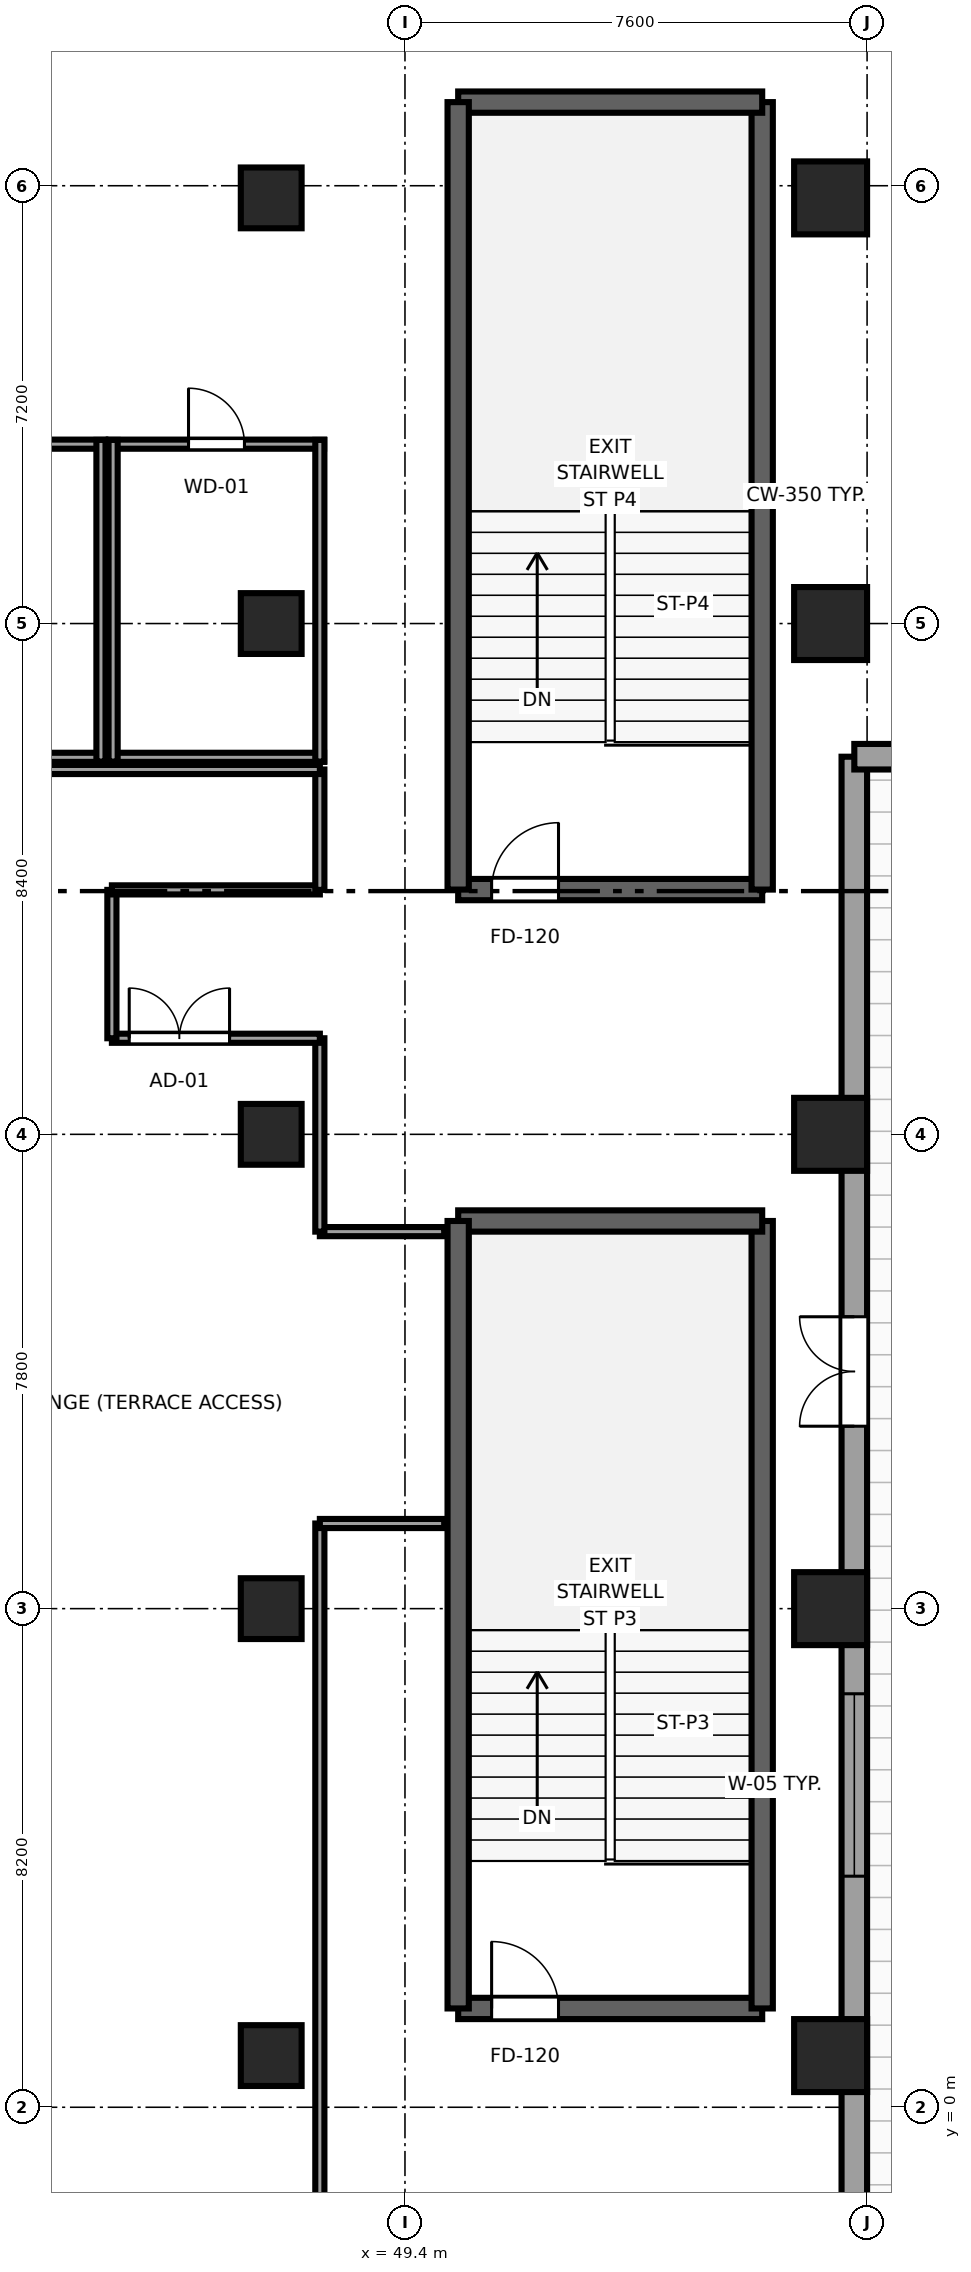
"""IFC4 building model, lengths in metres.
Left out: names, types, materials, properties, quantities, classifications, styles, units other than length and angle.
Written with IfcOpenShell. Run it as: python <this file> out.ifc"""

import sys

from ifc_helpers import new_model, si_unit, direction, frame, frame_2d, origin, origin_2d, place, context, subcontext, project, spatial, rectangle, extrude, source, transform, mapped, element, fill, save


model = new_model("IFC4")
c1 = context("Model", 3, precision=1e-05, world=origin(), true_north=direction((0.0, 1.0)))
c2 = subcontext(c1, "Body", "Model", "MODEL_VIEW")
j1 = project(units=[si_unit("LENGTHUNIT", "METRE"), si_unit("PLANEANGLEUNIT", "RADIAN")], contexts=[c1])
p1 = place(None, origin())
s1 = spatial("IfcSite", under=j1, at=p1, CompositionType="ELEMENT")
p2 = place(p1, origin())
s2 = spatial("IfcBuilding", under=s1, at=p2, CompositionType="ELEMENT")
p3 = place(p2, frame((0.0, 0.0, 26.8)))
s3 = spatial("IfcBuildingStorey", under=s2, at=p3, CompositionType="ELEMENT", Elevation=26.8)
p4 = place(p3, frame((50.275, 1.625, 0.0), z_axis=(0.0, 0.0, 1.0), x_axis=(1.0, 0.0, 0.0)))
e1 = element("IfcWall", 1, at=p4, inside=s3, PredefinedType="SHEAR", context=c2, shape_type="SweptSolid", body=[
    extrude(rectangle(XDim=5.0, YDim=0.35, at=frame_2d((2.5, 0.0))), origin(), (0.0, 0.0, 1.0), 5.2),
])
p5 = place(p4, frame((0.55, 0.0, 0.0)))
e2 = element("IfcOpeningElement", 2, at=p5, cuts=e1, PredefinedType="OPENING", context=c2, shape_type="SweptSolid", body=[
    extrude(rectangle(XDim=1.1, YDim=2.12, at=frame_2d((0.55, 1.06))), frame((0.0, 0.185, 0.0), z_axis=(0.0, -1.0, 0.0), x_axis=(1.0, 0.0, 0.0)), (0.0, 0.0, 1.0), 0.37),
])
p6 = place(p3, frame((55.275, 1.625, 0.0), z_axis=(0.0, 0.0, 1.0), x_axis=(0.0, 1.0, 0.0)))
e3 = element("IfcWall", 3, at=p6, inside=s3, PredefinedType="SHEAR", context=c2, shape_type="SweptSolid", body=[
    extrude(rectangle(XDim=12.95, YDim=0.35, at=frame_2d((6.475, 0.0))), origin(), (0.0, 0.0, 1.0), 5.2),
])
p7 = place(p3, frame((55.275, 14.575, 0.0), z_axis=(0.0, 0.0, 1.0), x_axis=(-1.0, 0.0, 0.0)))
e4 = element("IfcWall", 4, at=p7, inside=s3, PredefinedType="SHEAR", context=c2, shape_type="SweptSolid", body=[
    extrude(rectangle(XDim=5.0, YDim=0.35, at=frame_2d((2.5, 0.0))), origin(), (0.0, 0.0, 1.0), 5.2),
])
p8 = place(p3, frame((50.275, 14.575, 0.0), z_axis=(0.0, 0.0, 1.0), x_axis=(0.0, -1.0, 0.0)))
e5 = element("IfcWall", 5, at=p8, inside=s3, PredefinedType="SHEAR", context=c2, shape_type="SweptSolid", body=[
    extrude(rectangle(XDim=12.95, YDim=0.35, at=frame_2d((6.475, 0.0))), origin(), (0.0, 0.0, 1.0), 5.2),
])
p9 = place(p3, frame((50.275, 20.025, 0.0), z_axis=(0.0, 0.0, 1.0), x_axis=(1.0, 0.0, 0.0)))
e6 = element("IfcWall", 6, at=p9, inside=s3, PredefinedType="SHEAR", context=c2, shape_type="SweptSolid", body=[
    extrude(rectangle(XDim=5.0, YDim=0.35, at=frame_2d((2.5, 0.0))), origin(), (0.0, 0.0, 1.0), 5.2),
])
p10 = place(p9, frame((0.55, 0.0, 0.0)))
e7 = element("IfcOpeningElement", 7, at=p10, cuts=e6, PredefinedType="OPENING", context=c2, shape_type="SweptSolid", body=[
    extrude(rectangle(XDim=1.1, YDim=2.12, at=frame_2d((0.55, 1.06))), frame((0.0, 0.185, 0.0), z_axis=(0.0, -1.0, 0.0), x_axis=(1.0, 0.0, 0.0)), (0.0, 0.0, 1.0), 0.37),
])
p11 = place(p3, frame((55.275, 20.025, 0.0), z_axis=(0.0, 0.0, 1.0), x_axis=(0.0, 1.0, 0.0)))
e8 = element("IfcWall", 8, at=p11, inside=s3, PredefinedType="SHEAR", context=c2, shape_type="SweptSolid", body=[
    extrude(rectangle(XDim=12.95, YDim=0.35, at=frame_2d((6.475, 0.0))), origin(), (0.0, 0.0, 1.0), 5.2),
])
p12 = place(p3, frame((55.275, 32.975, 0.0), z_axis=(0.0, 0.0, 1.0), x_axis=(-1.0, 0.0, 0.0)))
e9 = element("IfcWall", 9, at=p12, inside=s3, PredefinedType="SHEAR", context=c2, shape_type="SweptSolid", body=[
    extrude(rectangle(XDim=5.0, YDim=0.35, at=frame_2d((2.5, 0.0))), origin(), (0.0, 0.0, 1.0), 5.2),
])
p13 = place(p3, frame((50.275, 32.975, 0.0), z_axis=(0.0, 0.0, 1.0), x_axis=(0.0, -1.0, 0.0)))
e10 = element("IfcWall", 10, at=p13, inside=s3, PredefinedType="SHEAR", context=c2, shape_type="SweptSolid", body=[
    extrude(rectangle(XDim=12.95, YDim=0.35, at=frame_2d((6.475, 0.0))), origin(), (0.0, 0.0, 1.0), 5.2),
])
m1 = source(origin(), c2, "Body", "SweptSolid", [
    extrude(rectangle(XDim=1.0, YDim=1.0, at=origin_2d()), origin(), (0.0, 0.0, 1.0), 5.2),
])
p14 = place(p3, frame((47.2, 0.85, 0.0), z_axis=(0.0, 0.0, 1.0), x_axis=(1.0, 0.0, 0.0)))
e11 = element("IfcColumn", 11, at=p14, inside=s3, PredefinedType="COLUMN", context=c2, shape_type="MappedRepresentation", body=[
    mapped(m1, transform((0.0, 0.0, 0.0), x_axis=(1.0, 0.0, 0.0), y_axis=(0.0, 1.0, 0.0), z_axis=(0.0, 0.0, 1.0), scale=1.0)),
])
m2 = source(origin(), c2, "Body", "SweptSolid", [
    extrude(rectangle(XDim=1.2, YDim=1.2, at=origin_2d()), origin(), (0.0, 0.0, 1.0), 5.2),
])
p15 = place(p3, frame((56.4, 0.85, 0.0), z_axis=(0.0, 0.0, 1.0), x_axis=(1.0, 0.0, 0.0)))
e12 = element("IfcColumn", 12, at=p15, inside=s3, PredefinedType="COLUMN", context=c2, shape_type="MappedRepresentation", body=[
    mapped(m2, transform((0.0, 0.0, 0.0), x_axis=(1.0, 0.0, 0.0), y_axis=(0.0, 1.0, 0.0), z_axis=(0.0, 0.0, 1.0), scale=1.0)),
])
p16 = place(p3, frame((47.2, 8.2, 0.0), z_axis=(0.0, 0.0, 1.0), x_axis=(1.0, 0.0, 0.0)))
e13 = element("IfcColumn", 13, at=p16, inside=s3, PredefinedType="COLUMN", context=c2, shape_type="MappedRepresentation", body=[
    mapped(m1, transform((0.0, 0.0, 0.0), x_axis=(1.0, 0.0, 0.0), y_axis=(0.0, 1.0, 0.0), z_axis=(0.0, 0.0, 1.0), scale=1.0)),
])
p17 = place(p3, frame((56.4, 8.2, 0.0), z_axis=(0.0, 0.0, 1.0), x_axis=(1.0, 0.0, 0.0)))
e14 = element("IfcColumn", 14, at=p17, inside=s3, PredefinedType="COLUMN", context=c2, shape_type="MappedRepresentation", body=[
    mapped(m2, transform((0.0, 0.0, 0.0), x_axis=(1.0, 0.0, 0.0), y_axis=(0.0, 1.0, 0.0), z_axis=(0.0, 0.0, 1.0), scale=1.0)),
])
p18 = place(p3, frame((47.2, 16.0, 0.0), z_axis=(0.0, 0.0, 1.0), x_axis=(1.0, 0.0, 0.0)))
e15 = element("IfcColumn", 15, at=p18, inside=s3, PredefinedType="COLUMN", context=c2, shape_type="MappedRepresentation", body=[
    mapped(m1, transform((0.0, 0.0, 0.0), x_axis=(1.0, 0.0, 0.0), y_axis=(0.0, 1.0, 0.0), z_axis=(0.0, 0.0, 1.0), scale=1.0)),
])
p19 = place(p3, frame((56.4, 16.0, 0.0), z_axis=(0.0, 0.0, 1.0), x_axis=(1.0, 0.0, 0.0)))
e16 = element("IfcColumn", 16, at=p19, inside=s3, PredefinedType="COLUMN", context=c2, shape_type="MappedRepresentation", body=[
    mapped(m2, transform((0.0, 0.0, 0.0), x_axis=(1.0, 0.0, 0.0), y_axis=(0.0, 1.0, 0.0), z_axis=(0.0, 0.0, 1.0), scale=1.0)),
])
p20 = place(p3, frame((47.2, 24.4, 0.0), z_axis=(0.0, 0.0, 1.0), x_axis=(1.0, 0.0, 0.0)))
e17 = element("IfcColumn", 17, at=p20, inside=s3, PredefinedType="COLUMN", context=c2, shape_type="MappedRepresentation", body=[
    mapped(m1, transform((0.0, 0.0, 0.0), x_axis=(1.0, 0.0, 0.0), y_axis=(0.0, 1.0, 0.0), z_axis=(0.0, 0.0, 1.0), scale=1.0)),
])
p21 = place(p3, frame((56.4, 24.4, 0.0), z_axis=(0.0, 0.0, 1.0), x_axis=(1.0, 0.0, 0.0)))
e18 = element("IfcColumn", 18, at=p21, inside=s3, PredefinedType="COLUMN", context=c2, shape_type="MappedRepresentation", body=[
    mapped(m2, transform((0.0, 0.0, 0.0), x_axis=(1.0, 0.0, 0.0), y_axis=(0.0, 1.0, 0.0), z_axis=(0.0, 0.0, 1.0), scale=1.0)),
])
p22 = place(p3, frame((47.2, 31.4, 0.0), z_axis=(0.0, 0.0, 1.0), x_axis=(1.0, 0.0, 0.0)))
e19 = element("IfcColumn", 19, at=p22, inside=s3, PredefinedType="COLUMN", context=c2, shape_type="MappedRepresentation", body=[
    mapped(m1, transform((0.0, 0.0, 0.0), x_axis=(1.0, 0.0, 0.0), y_axis=(0.0, 1.0, 0.0), z_axis=(0.0, 0.0, 1.0), scale=1.0)),
])
p23 = place(p3, frame((56.4, 31.4, 0.0), z_axis=(0.0, 0.0, 1.0), x_axis=(1.0, 0.0, 0.0)))
e20 = element("IfcColumn", 20, at=p23, inside=s3, PredefinedType="COLUMN", context=c2, shape_type="MappedRepresentation", body=[
    mapped(m2, transform((0.0, 0.0, 0.0), x_axis=(1.0, 0.0, 0.0), y_axis=(0.0, 1.0, 0.0), z_axis=(0.0, 0.0, 1.0), scale=1.0)),
])
p24 = place(p3, frame((56.79, -2.29, 0.0), z_axis=(0.0, 0.0, 1.0), x_axis=(0.0, 1.0, 0.0)))
e21 = element("IfcWall", 21, at=p24, inside=s3, PredefinedType="SOLIDWALL", context=c2, shape_type="SweptSolid", body=[
    extrude(rectangle(XDim=24.5, YDim=0.42, at=frame_2d((12.25, 0.0))), origin(), (0.0, 0.0, 1.0), 4.94),
])
p25 = place(p24, frame((15.29, 0.0, 0.0), z_axis=(0.0, 0.0, 1.0), x_axis=(-1.0, 0.0, 0.0)))
e22 = element("IfcOpeningElement", 22, at=p25, cuts=e21, PredefinedType="OPENING", context=c2, shape_type="SweptSolid", body=[
    extrude(rectangle(XDim=1.8, YDim=2.15, at=frame_2d((0.9, 1.075))), frame((0.0, 0.22, 0.0), z_axis=(0.0, -1.0, 0.0), x_axis=(1.0, 0.0, 0.0)), (0.0, 0.0, 1.0), 0.44),
])
p26 = place(p24, frame((6.09, 0.0, 0.65)))
e23 = element("IfcOpeningElement", 23, at=p26, cuts=e21, PredefinedType="OPENING", context=c2, shape_type="SweptSolid", body=[
    extrude(rectangle(XDim=3.0, YDim=2.5, at=frame_2d((1.5, 1.25))), frame((0.0, 0.22, 0.0), z_axis=(0.0, -1.0, 0.0), x_axis=(1.0, 0.0, 0.0)), (0.0, 0.0, 1.0), 0.44),
])
p27 = place(p3, frame((56.79, 22.21, 0.0), z_axis=(0.0, 0.0, 1.0), x_axis=(1.0, 0.0, 0.0)))
e24 = element("IfcWall", 24, at=p27, inside=s3, PredefinedType="SOLIDWALL", context=c2, shape_type="SweptSolid", body=[
    extrude(rectangle(XDim=8.4, YDim=0.42, at=frame_2d((4.2, 0.0))), origin(), (0.0, 0.0, 1.0), 4.94),
])
p28 = place(p27, frame((2.7, 0.0, 0.65)))
e25 = element("IfcOpeningElement", 25, at=p28, cuts=e24, PredefinedType="OPENING", context=c2, shape_type="SweptSolid", body=[
    extrude(rectangle(XDim=3.0, YDim=2.5, at=frame_2d((1.5, 1.25))), frame((0.0, 0.22, 0.0), z_axis=(0.0, -1.0, 0.0), x_axis=(1.0, 0.0, 0.0)), (0.0, 0.0, 1.0), 0.44),
])
p29 = place(p3, frame((48.0, -2.025, 0.0), z_axis=(0.0, 0.0, 1.0), x_axis=(0.0, 1.0, 0.0)))
e26 = element("IfcWall", 26, at=p29, inside=s3, PredefinedType="PARTITIONING", context=c2, shape_type="SweptSolid", body=[
    extrude(rectangle(XDim=11.625, YDim=0.15, at=frame_2d((5.812, 0.0))), origin(), (0.0, 0.0, 1.0), 4.94),
])
for number, where, z_axis, x_axis in (
    (27, (48.0, 9.6, 0.0), (0.0, 0.0, 1.0), (1.0, 0.0, 0.0)),
    (28, (48.0, 14.4, 0.0), (0.0, 0.0, 1.0), (1.0, 0.0, 0.0)),
):
    element("IfcWall", number, at=place(p3, frame(where, z_axis=z_axis, x_axis=x_axis)), inside=s3, PredefinedType="PARTITIONING", context=c2, shape_type="SweptSolid", body=[
        extrude(rectangle(XDim=2.045, YDim=0.15, at=frame_2d((1.022, 0.0))), origin(), (0.0, 0.0, 1.0), 4.94),
    ])
p30 = place(p3, frame((48.0, 14.4, 0.0), z_axis=(0.0, 0.0, 1.0), x_axis=(0.0, 1.0, 0.0)))
e29 = element("IfcWall", 29, at=p30, inside=s3, PredefinedType="PARTITIONING", context=c2, shape_type="SweptSolid", body=[
    extrude(rectangle(XDim=3.18, YDim=0.15, at=frame_2d((1.59, 0.0))), origin(), (0.0, 0.0, 1.0), 4.94),
])
p31 = place(p3, frame((44.58, 17.58, 0.0), z_axis=(0.0, 0.0, 1.0), x_axis=(1.0, 0.0, 0.0)))
e30 = element("IfcWall", 30, at=p31, inside=s3, PredefinedType="PARTITIONING", context=c2, shape_type="SweptSolid", body=[
    extrude(rectangle(XDim=3.42, YDim=0.15, at=frame_2d((1.71, 0.0))), origin(), (0.0, 0.0, 1.0), 4.94),
])
p32 = place(p31, frame((0.285, 0.0, 0.0)))
e31 = element("IfcOpeningElement", 31, at=p32, cuts=e30, PredefinedType="OPENING", context=c2, shape_type="SweptSolid", body=[
    extrude(rectangle(XDim=1.65, YDim=2.15, at=frame_2d((0.825, 1.075))), frame((0.0, 0.085, 0.0), z_axis=(0.0, -1.0, 0.0), x_axis=(1.0, 0.0, 0.0)), (0.0, 0.0, 1.0), 0.17),
])
p33 = place(p3, frame((44.58, 17.58, 0.0), z_axis=(0.0, 0.0, 1.0), x_axis=(0.0, 1.0, 0.0)))
e32 = element("IfcWall", 32, at=p33, inside=s3, PredefinedType="PARTITIONING", context=c2, shape_type="SweptSolid", body=[
    extrude(rectangle(XDim=2.44, YDim=0.15, at=frame_2d((1.22, 0.0))), origin(), (0.0, 0.0, 1.0), 4.94),
])
p34 = place(p3, frame((44.58, 20.02, 0.0), z_axis=(0.0, 0.0, 1.0), x_axis=(1.0, 0.0, 0.0)))
e33 = element("IfcWall", 33, at=p34, inside=s3, PredefinedType="PARTITIONING", context=c2, shape_type="SweptSolid", body=[
    extrude(rectangle(XDim=3.42, YDim=0.15, at=frame_2d((1.71, 0.0))), origin(), (0.0, 0.0, 1.0), 4.94),
])
p35 = place(p3, frame((48.0, 20.02, 0.0), z_axis=(0.0, 0.0, 1.0), x_axis=(0.0, 1.0, 0.0)))
e34 = element("IfcWall", 34, at=p35, inside=s3, PredefinedType="PARTITIONING", context=c2, shape_type="SweptSolid", body=[
    extrude(rectangle(XDim=1.98, YDim=0.15, at=frame_2d((0.99, 0.0))), origin(), (0.0, 0.0, 1.0), 4.94),
])
p36 = place(p3, frame((37.8, 22.0, 0.0), z_axis=(0.0, 0.0, 1.0), x_axis=(1.0, 0.0, 0.0)))
e35 = element("IfcWall", 35, at=p36, inside=s3, PredefinedType="PARTITIONING", context=c2, shape_type="SweptSolid", body=[
    extrude(rectangle(XDim=10.2, YDim=0.15, at=frame_2d((5.1, 0.0))), origin(), (0.0, 0.0, 1.0), 4.94),
])
p37 = place(p3, frame((37.73, 22.2, 0.0), z_axis=(0.0, 0.0, 1.0), x_axis=(1.0, 0.0, 0.0)))
e36 = element("IfcWall", 36, at=p37, inside=s3, PredefinedType="PARTITIONING", context=c2, shape_type="SweptSolid", body=[
    extrude(rectangle(XDim=6.74, YDim=0.15, at=frame_2d((3.37, 0.0))), origin(), (0.0, 0.0, 1.0), 4.94),
])
p38 = place(p3, frame((37.73, 27.35, 0.0), z_axis=(0.0, 0.0, 1.0), x_axis=(1.0, 0.0, 0.0)))
e37 = element("IfcWall", 37, at=p38, inside=s3, PredefinedType="PARTITIONING", context=c2, shape_type="SweptSolid", body=[
    extrude(rectangle(XDim=6.74, YDim=0.15, at=frame_2d((3.37, 0.0))), origin(), (0.0, 0.0, 1.0), 4.94),
])
p39 = place(p38, frame((2.91, 0.0, 0.0)))
e38 = element("IfcOpeningElement", 38, at=p39, cuts=e37, PredefinedType="OPENING", context=c2, shape_type="SweptSolid", body=[
    extrude(rectangle(XDim=0.92, YDim=2.01, at=frame_2d((0.46, 1.005))), frame((0.0, 0.085, 0.0), z_axis=(0.0, -1.0, 0.0), x_axis=(1.0, 0.0, 0.0)), (0.0, 0.0, 1.0), 0.17),
])
p40 = place(p3, frame((44.4, 22.13, 0.0), z_axis=(0.0, 0.0, 1.0), x_axis=(0.0, 1.0, 0.0)))
e39 = element("IfcWall", 39, at=p40, inside=s3, PredefinedType="PARTITIONING", context=c2, shape_type="SweptSolid", body=[
    extrude(rectangle(XDim=5.29, YDim=0.15, at=frame_2d((2.645, 0.0))), origin(), (0.0, 0.0, 1.0), 4.94),
])
p41 = place(p3, frame((44.53, 22.2, 0.0), z_axis=(0.0, 0.0, 1.0), x_axis=(1.0, 0.0, 0.0)))
e40 = element("IfcWall", 40, at=p41, inside=s3, PredefinedType="PARTITIONING", context=c2, shape_type="SweptSolid", body=[
    extrude(rectangle(XDim=3.54, YDim=0.15, at=frame_2d((1.77, 0.0))), origin(), (0.0, 0.0, 1.0), 4.94),
])
p42 = place(p3, frame((44.53, 27.35, 0.0), z_axis=(0.0, 0.0, 1.0), x_axis=(1.0, 0.0, 0.0)))
e41 = element("IfcWall", 41, at=p42, inside=s3, PredefinedType="PARTITIONING", context=c2, shape_type="SweptSolid", body=[
    extrude(rectangle(XDim=3.54, YDim=0.15, at=frame_2d((1.77, 0.0))), origin(), (0.0, 0.0, 1.0), 4.94),
])
p43 = place(p42, frame((1.31, 0.0, 0.0)))
e42 = element("IfcOpeningElement", 42, at=p43, cuts=e41, PredefinedType="OPENING", context=c2, shape_type="SweptSolid", body=[
    extrude(rectangle(XDim=0.92, YDim=2.01, at=frame_2d((0.46, 1.005))), frame((0.0, 0.085, 0.0), z_axis=(0.0, -1.0, 0.0), x_axis=(1.0, 0.0, 0.0)), (0.0, 0.0, 1.0), 0.17),
])
for number, where, z_axis, x_axis in (
    (43, (44.6, 22.13, 0.0), (0.0, 0.0, 1.0), (0.0, 1.0, 0.0)),
    (44, (48.0, 22.13, 0.0), (0.0, 0.0, 1.0), (0.0, 1.0, 0.0)),
):
    element("IfcWall", number, at=place(p3, frame(where, z_axis=z_axis, x_axis=x_axis)), inside=s3, PredefinedType="PARTITIONING", context=c2, shape_type="SweptSolid", body=[
        extrude(rectangle(XDim=5.29, YDim=0.15, at=frame_2d((2.645, 0.0))), origin(), (0.0, 0.0, 1.0), 4.94),
    ])
m3 = source(origin(), c2, "Body", "SweptSolid", [
    extrude(rectangle(XDim=1.8, YDim=2.15, at=frame_2d((0.9, 1.075))), frame((0.0, 0.025, 0.0), z_axis=(0.0, -1.0, 0.0), x_axis=(1.0, 0.0, 0.0)), (0.0, 0.0, 1.0), 0.05),
])
p44 = place(p25, origin())
e45 = element("IfcDoor", 45, at=p44, inside=s3, OperationType="DOUBLE_DOOR_SINGLE_SWING", PredefinedType="DOOR", context=c2, shape_type="MappedRepresentation", body=[
    mapped(m3, transform((0.0, 0.0, 0.0), x_axis=(1.0, 0.0, 0.0), y_axis=(0.0, 1.0, 0.0), z_axis=(0.0, 0.0, 1.0), scale=1.0)),
])
fill(e22, e45)
m4 = source(origin(), c2, "Body", "SweptSolid", [
    extrude(rectangle(XDim=3.0, YDim=2.5, at=frame_2d((1.5, 1.25))), frame((0.0, 0.09, 0.0), z_axis=(0.0, -1.0, 0.0), x_axis=(1.0, 0.0, 0.0)), (0.0, 0.0, 1.0), 0.06),
])
p45 = place(p26, origin())
e46 = element("IfcWindow", 46, at=p45, inside=s3, PartitioningType="TRIPLE_PANEL_HORIZONTAL", PredefinedType="WINDOW", context=c2, shape_type="MappedRepresentation", body=[
    mapped(m4, transform((0.0, 0.0, 0.0), x_axis=(1.0, 0.0, 0.0), y_axis=(0.0, 1.0, 0.0), z_axis=(0.0, 0.0, 1.0), scale=1.0)),
])
fill(e23, e46)
m5 = source(origin(), c2, "Body", "SweptSolid", [
    extrude(rectangle(XDim=1.1, YDim=2.12, at=frame_2d((0.55, 1.06))), frame((0.0, 0.025, 0.0), z_axis=(0.0, -1.0, 0.0), x_axis=(1.0, 0.0, 0.0)), (0.0, 0.0, 1.0), 0.05),
])
p46 = place(p5, origin())
e47 = element("IfcDoor", 47, at=p46, inside=s3, OperationType="SINGLE_SWING_LEFT", PredefinedType="DOOR", context=c2, shape_type="MappedRepresentation", body=[
    mapped(m5, transform((0.0, 0.0, 0.0), x_axis=(1.0, 0.0, 0.0), y_axis=(0.0, 1.0, 0.0), z_axis=(0.0, 0.0, 1.0), scale=1.0)),
])
fill(e2, e47)
p47 = place(p10, origin())
e48 = element("IfcDoor", 48, at=p47, inside=s3, OperationType="SINGLE_SWING_RIGHT", PredefinedType="DOOR", context=c2, shape_type="MappedRepresentation", body=[
    mapped(m5, transform((0.0, 0.0, 0.0), x_axis=(1.0, 0.0, 0.0), y_axis=(0.0, 1.0, 0.0), z_axis=(0.0, 0.0, 1.0), scale=1.0)),
])
fill(e7, e48)
m6 = source(origin(), c2, "Body", "SweptSolid", [
    extrude(rectangle(XDim=1.65, YDim=2.15, at=frame_2d((0.825, 1.075))), frame((0.0, 0.025, 0.0), z_axis=(0.0, -1.0, 0.0), x_axis=(1.0, 0.0, 0.0)), (0.0, 0.0, 1.0), 0.05),
])
p48 = place(p32, origin())
e49 = element("IfcDoor", 49, at=p48, inside=s3, OperationType="DOUBLE_DOOR_SINGLE_SWING", PredefinedType="DOOR", context=c2, shape_type="MappedRepresentation", body=[
    mapped(m6, transform((0.0, 0.0, 0.0), x_axis=(1.0, 0.0, 0.0), y_axis=(0.0, 1.0, 0.0), z_axis=(0.0, 0.0, 1.0), scale=1.0)),
])
fill(e31, e49)
m7 = source(origin(), c2, "Body", "SweptSolid", [
    extrude(rectangle(XDim=0.92, YDim=2.01, at=frame_2d((0.46, 1.005))), frame((0.0, 0.025, 0.0), z_axis=(0.0, -1.0, 0.0), x_axis=(1.0, 0.0, 0.0)), (0.0, 0.0, 1.0), 0.05),
])
p49 = place(p43, origin())
e50 = element("IfcDoor", 50, at=p49, inside=s3, OperationType="SINGLE_SWING_LEFT", PredefinedType="DOOR", context=c2, shape_type="MappedRepresentation", body=[
    mapped(m7, transform((0.0, 0.0, 0.0), x_axis=(1.0, 0.0, 0.0), y_axis=(0.0, 1.0, 0.0), z_axis=(0.0, 0.0, 1.0), scale=1.0)),
])
fill(e42, e50)
save(model, sys.argv[1])
